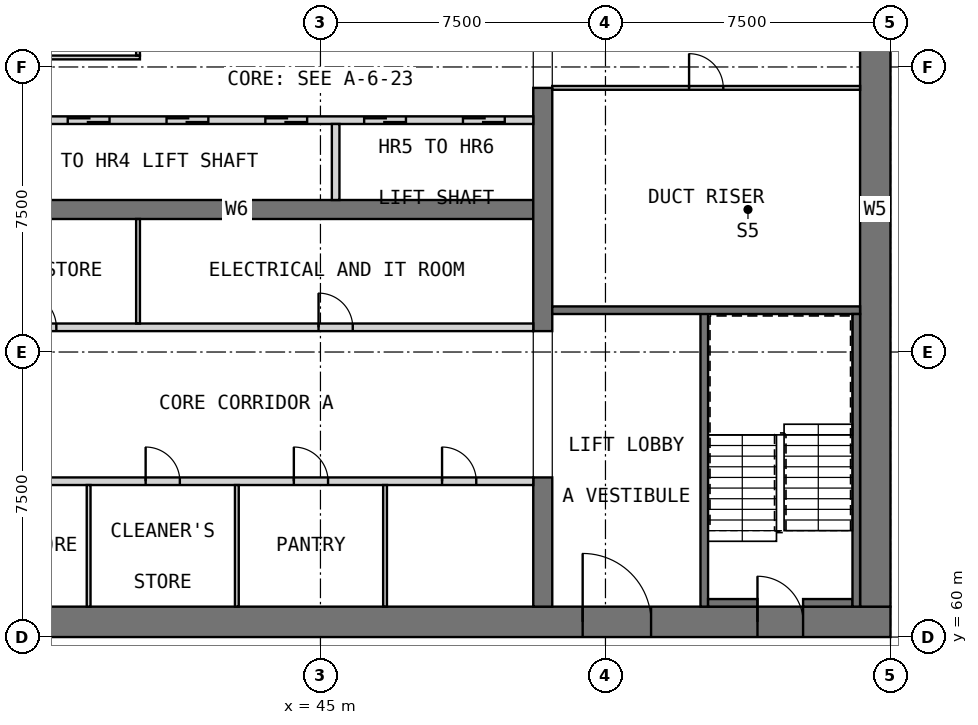
"""IFC4 building model, lengths in metres.
Left out: names, types, materials, properties, quantities, classifications, styles, units other than length and angle.
Written with IfcOpenShell. Run it as: python <this file> out.ifc"""

import sys

from ifc_helpers import new_model, si_unit, direction, frame, frame_2d, origin, place, context, subcontext, project, spatial, rectangle, extrude, element, fill, save


model = new_model("IFC4")
c1 = context("Model", 3, precision=1e-05, world=origin(), true_north=direction((0.0, 1.0)))
c2 = subcontext(c1, "Body", "Model", "MODEL_VIEW")
j1 = project(units=[si_unit("LENGTHUNIT", "METRE"), si_unit("PLANEANGLEUNIT", "RADIAN")], contexts=[c1])
p1 = place(None, origin())
s1 = spatial("IfcSite", under=j1, at=p1, CompositionType="ELEMENT")
p2 = place(p1, origin())
s2 = spatial("IfcBuilding", under=s1, at=p2, CompositionType="ELEMENT")
p3 = place(p2, frame((0.0, 0.0, 186.2)))
s3 = spatial("IfcBuildingStorey", under=s2, at=p3, CompositionType="ELEMENT", Elevation=186.2)
p4 = place(p3, frame((30.0, 60.4, 0.0), z_axis=(0.0, 0.0, 1.0), x_axis=(1.0, 0.0, 0.0)))
e1 = element("IfcWall", 1, at=p4, inside=s3, PredefinedType="SHEAR", context=c2, shape_type="SweptSolid", body=[
    extrude(rectangle(XDim=30.0, YDim=0.8, at=frame_2d((15.0, 0.0))), origin(), (0.0, 0.0, 1.0), 3.5),
])
p5 = place(p4, frame((21.9, 0.0, 0.0)))
e2 = element("IfcOpeningElement", 2, at=p5, cuts=e1, PredefinedType="OPENING", context=c2, shape_type="SweptSolid", body=[
    extrude(rectangle(XDim=1.8, YDim=2.1, at=frame_2d((0.9, 1.05))), frame((0.0, 0.41, 0.0), z_axis=(0.0, -1.0, 0.0), x_axis=(1.0, 0.0, 0.0)), (0.0, 0.0, 1.0), 0.82),
])
p6 = place(p4, frame((26.5, 0.0, 0.0)))
e3 = element("IfcOpeningElement", 3, at=p6, cuts=e1, PredefinedType="OPENING", context=c2, shape_type="SweptSolid", body=[
    extrude(rectangle(XDim=1.2, YDim=2.1, at=frame_2d((0.6, 1.05))), frame((0.0, 0.41, 0.0), z_axis=(0.0, -1.0, 0.0), x_axis=(1.0, 0.0, 0.0)), (0.0, 0.0, 1.0), 0.82),
])
p7 = place(p3, frame((59.6, 60.8, 0.0), z_axis=(0.0, 0.0, 1.0), x_axis=(0.0, 1.0, 0.0)))
e4 = element("IfcWall", 4, at=p7, inside=s3, PredefinedType="SHEAR", context=c2, shape_type="SweptSolid", body=[
    extrude(rectangle(XDim=20.9, YDim=0.8, at=frame_2d((10.45, 0.0))), origin(), (0.0, 0.0, 1.0), 3.5),
])
p8 = place(p7, frame((14.7, 0.0, 0.0)))
e5 = element("IfcOpeningElement", 5, at=p8, cuts=e4, PredefinedType="OPENING", context=c2, shape_type="SweptSolid", body=[
    extrude(rectangle(XDim=1.8, YDim=2.1, at=frame_2d((0.9, 1.05))), frame((0.0, 0.41, 0.0), z_axis=(0.0, -1.0, 0.0), x_axis=(1.0, 0.0, 0.0)), (0.0, 0.0, 1.0), 0.82),
])
p9 = place(p3, frame((35.0, 71.25, 0.0), z_axis=(0.0, 0.0, 1.0), x_axis=(1.0, 0.0, 0.0)))
e6 = element("IfcWall", 6, at=p9, inside=s3, PredefinedType="SHEAR", context=c2, shape_type="SweptSolid", body=[
    extrude(rectangle(XDim=15.6, YDim=0.5, at=frame_2d((7.8, 0.0))), origin(), (0.0, 0.0, 1.0), 3.5),
])
p10 = place(p3, frame((50.85, 60.8, 0.0), z_axis=(0.0, 0.0, 1.0), x_axis=(0.0, 1.0, 0.0)))
e7 = element("IfcWall", 7, at=p10, inside=s3, PredefinedType="SHEAR", context=c2, shape_type="SweptSolid", body=[
    extrude(rectangle(XDim=3.4, YDim=0.5, at=frame_2d((1.7, 0.0))), origin(), (0.0, 0.0, 1.0), 3.5),
])
p11 = place(p3, frame((50.85, 68.05, 0.0), z_axis=(0.0, 0.0, 1.0), x_axis=(0.0, 1.0, 0.0)))
e8 = element("IfcWall", 8, at=p11, inside=s3, PredefinedType="SHEAR", context=c2, shape_type="SweptSolid", body=[
    extrude(rectangle(XDim=6.4, YDim=0.5, at=frame_2d((3.2, 0.0))), origin(), (0.0, 0.0, 1.0), 3.5),
])
p12 = place(p3, frame((35.0, 64.1, 0.0), z_axis=(0.0, 0.0, 1.0), x_axis=(1.0, 0.0, 0.0)))
e9 = element("IfcWall", 9, at=p12, inside=s3, PredefinedType="PARTITIONING", context=c2, shape_type="SweptSolid", body=[
    extrude(rectangle(XDim=15.6, YDim=0.2, at=frame_2d((7.8, 0.0))), origin(), (0.0, 0.0, 1.0), 3.25),
])
p13 = place(p12, frame((1.5, 0.0, 0.0)))
e10 = element("IfcOpeningElement", 10, at=p13, cuts=e9, PredefinedType="OPENING", context=c2, shape_type="SweptSolid", body=[
    extrude(rectangle(XDim=0.9, YDim=2.1, at=frame_2d((0.45, 1.05))), frame((0.0, 0.11, 0.0), z_axis=(0.0, -1.0, 0.0), x_axis=(1.0, 0.0, 0.0)), (0.0, 0.0, 1.0), 0.22),
])
p14 = place(p12, frame((5.4, 0.0, 0.0)))
e11 = element("IfcOpeningElement", 11, at=p14, cuts=e9, PredefinedType="OPENING", context=c2, shape_type="SweptSolid", body=[
    extrude(rectangle(XDim=0.9, YDim=2.1, at=frame_2d((0.45, 1.05))), frame((0.0, 0.11, 0.0), z_axis=(0.0, -1.0, 0.0), x_axis=(1.0, 0.0, 0.0)), (0.0, 0.0, 1.0), 0.22),
])
p15 = place(p12, frame((9.3, 0.0, 0.0)))
e12 = element("IfcOpeningElement", 12, at=p15, cuts=e9, PredefinedType="OPENING", context=c2, shape_type="SweptSolid", body=[
    extrude(rectangle(XDim=0.9, YDim=2.1, at=frame_2d((0.45, 1.05))), frame((0.0, 0.11, 0.0), z_axis=(0.0, -1.0, 0.0), x_axis=(1.0, 0.0, 0.0)), (0.0, 0.0, 1.0), 0.22),
])
p16 = place(p12, frame((13.2, 0.0, 0.0)))
e13 = element("IfcOpeningElement", 13, at=p16, cuts=e9, PredefinedType="OPENING", context=c2, shape_type="SweptSolid", body=[
    extrude(rectangle(XDim=0.9, YDim=2.1, at=frame_2d((0.45, 1.05))), frame((0.0, 0.11, 0.0), z_axis=(0.0, -1.0, 0.0), x_axis=(1.0, 0.0, 0.0)), (0.0, 0.0, 1.0), 0.22),
])
for number, where, z_axis, x_axis in (
    (14, (38.9, 60.8, 0.0), (0.0, 0.0, 1.0), (0.0, 1.0, 0.0)),
    (15, (42.8, 60.8, 0.0), (0.0, 0.0, 1.0), (0.0, 1.0, 0.0)),
    (16, (46.7, 60.8, 0.0), (0.0, 0.0, 1.0), (0.0, 1.0, 0.0)),
):
    element("IfcWall", number, at=place(p3, frame(where, z_axis=z_axis, x_axis=x_axis)), inside=s3, PredefinedType="PARTITIONING", context=c2, shape_type="SweptSolid", body=[
        extrude(rectangle(XDim=3.2, YDim=0.1, at=frame_2d((1.6, 0.0))), origin(), (0.0, 0.0, 1.0), 3.25),
    ])
p17 = place(p3, frame((35.0, 68.15, 0.0), z_axis=(0.0, 0.0, 1.0), x_axis=(1.0, 0.0, 0.0)))
e17 = element("IfcWall", 17, at=p17, inside=s3, PredefinedType="PARTITIONING", context=c2, shape_type="SweptSolid", body=[
    extrude(rectangle(XDim=15.6, YDim=0.2, at=frame_2d((7.8, 0.0))), origin(), (0.0, 0.0, 1.0), 3.25),
])
p18 = place(p17, frame((2.15, 0.0, 0.0)))
e18 = element("IfcOpeningElement", 18, at=p18, cuts=e17, PredefinedType="OPENING", context=c2, shape_type="SweptSolid", body=[
    extrude(rectangle(XDim=0.9, YDim=2.1, at=frame_2d((0.45, 1.05))), frame((0.0, 0.11, 0.0), z_axis=(0.0, -1.0, 0.0), x_axis=(1.0, 0.0, 0.0)), (0.0, 0.0, 1.0), 0.22),
])
p19 = place(p17, frame((9.95, 0.0, 0.0)))
e19 = element("IfcOpeningElement", 19, at=p19, cuts=e17, PredefinedType="OPENING", context=c2, shape_type="SweptSolid", body=[
    extrude(rectangle(XDim=0.9, YDim=2.1, at=frame_2d((0.45, 1.05))), frame((0.0, 0.11, 0.0), z_axis=(0.0, -1.0, 0.0), x_axis=(1.0, 0.0, 0.0)), (0.0, 0.0, 1.0), 0.22),
])
p20 = place(p3, frame((40.2, 68.25, 0.0), z_axis=(0.0, 0.0, 1.0), x_axis=(0.0, 1.0, 0.0)))
e20 = element("IfcWall", 20, at=p20, inside=s3, PredefinedType="PARTITIONING", context=c2, shape_type="SweptSolid", body=[
    extrude(rectangle(XDim=2.75, YDim=0.1, at=frame_2d((1.375, 0.0))), origin(), (0.0, 0.0, 1.0), 3.25),
])
p21 = place(p3, frame((35.0, 73.6, 0.0), z_axis=(0.0, 0.0, 1.0), x_axis=(1.0, 0.0, 0.0)))
e21 = element("IfcWall", 21, at=p21, inside=s3, PredefinedType="SOLIDWALL", context=c2, shape_type="SweptSolid", body=[
    extrude(rectangle(XDim=15.6, YDim=0.2, at=frame_2d((7.8, 0.0))), origin(), (0.0, 0.0, 1.0), 3.5),
])
p22 = place(p21, frame((0.75, 0.0, 0.0)))
e22 = element("IfcOpeningElement", 22, at=p22, cuts=e21, PredefinedType="OPENING", context=c2, shape_type="SweptSolid", body=[
    extrude(rectangle(XDim=1.1, YDim=2.1, at=frame_2d((0.55, 1.05))), frame((0.0, 0.11, 0.0), z_axis=(0.0, -1.0, 0.0), x_axis=(1.0, 0.0, 0.0)), (0.0, 0.0, 1.0), 0.22),
])
p23 = place(p21, frame((3.35, 0.0, 0.0)))
e23 = element("IfcOpeningElement", 23, at=p23, cuts=e21, PredefinedType="OPENING", context=c2, shape_type="SweptSolid", body=[
    extrude(rectangle(XDim=1.1, YDim=2.1, at=frame_2d((0.55, 1.05))), frame((0.0, 0.11, 0.0), z_axis=(0.0, -1.0, 0.0), x_axis=(1.0, 0.0, 0.0)), (0.0, 0.0, 1.0), 0.22),
])
p24 = place(p21, frame((5.95, 0.0, 0.0)))
e24 = element("IfcOpeningElement", 24, at=p24, cuts=e21, PredefinedType="OPENING", context=c2, shape_type="SweptSolid", body=[
    extrude(rectangle(XDim=1.1, YDim=2.1, at=frame_2d((0.55, 1.05))), frame((0.0, 0.11, 0.0), z_axis=(0.0, -1.0, 0.0), x_axis=(1.0, 0.0, 0.0)), (0.0, 0.0, 1.0), 0.22),
])
p25 = place(p21, frame((8.55, 0.0, 0.0)))
e25 = element("IfcOpeningElement", 25, at=p25, cuts=e21, PredefinedType="OPENING", context=c2, shape_type="SweptSolid", body=[
    extrude(rectangle(XDim=1.1, YDim=2.1, at=frame_2d((0.55, 1.05))), frame((0.0, 0.11, 0.0), z_axis=(0.0, -1.0, 0.0), x_axis=(1.0, 0.0, 0.0)), (0.0, 0.0, 1.0), 0.22),
])
p26 = place(p21, frame((11.15, 0.0, 0.0)))
e26 = element("IfcOpeningElement", 26, at=p26, cuts=e21, PredefinedType="OPENING", context=c2, shape_type="SweptSolid", body=[
    extrude(rectangle(XDim=1.1, YDim=2.1, at=frame_2d((0.55, 1.05))), frame((0.0, 0.11, 0.0), z_axis=(0.0, -1.0, 0.0), x_axis=(1.0, 0.0, 0.0)), (0.0, 0.0, 1.0), 0.22),
])
p27 = place(p21, frame((13.75, 0.0, 0.0)))
e27 = element("IfcOpeningElement", 27, at=p27, cuts=e21, PredefinedType="OPENING", context=c2, shape_type="SweptSolid", body=[
    extrude(rectangle(XDim=1.1, YDim=2.1, at=frame_2d((0.55, 1.05))), frame((0.0, 0.11, 0.0), z_axis=(0.0, -1.0, 0.0), x_axis=(1.0, 0.0, 0.0)), (0.0, 0.0, 1.0), 0.22),
])
p28 = place(p3, frame((45.4, 71.5, 0.0), z_axis=(0.0, 0.0, 1.0), x_axis=(0.0, 1.0, 0.0)))
e28 = element("IfcWall", 28, at=p28, inside=s3, PredefinedType="SOLIDWALL", context=c2, shape_type="SweptSolid", body=[
    extrude(rectangle(XDim=2.0, YDim=0.2, at=frame_2d((1.0, 0.0))), origin(), (0.0, 0.0, 1.0), 3.5),
])
p29 = place(p3, frame((35.0, 75.25, 0.0), z_axis=(0.0, 0.0, 1.0), x_axis=(1.0, 0.0, 0.0)))
e29 = element("IfcWall", 29, at=p29, inside=s3, PredefinedType="PARTITIONING", context=c2, shape_type="SweptSolid", body=[
    extrude(rectangle(XDim=5.25, YDim=0.1, at=frame_2d((2.625, 0.0))), origin(), (0.0, 0.0, 1.0), 3.25),
])
p30 = place(p3, frame((40.2, 75.3, 0.0), z_axis=(0.0, 0.0, 1.0), x_axis=(0.0, 1.0, 0.0)))
e30 = element("IfcWall", 30, at=p30, inside=s3, PredefinedType="PARTITIONING", context=c2, shape_type="SweptSolid", body=[
    extrude(rectangle(XDim=3.0, YDim=0.1, at=frame_2d((1.5, 0.0))), origin(), (0.0, 0.0, 1.0), 3.25),
])
p31 = place(p30, frame((1.2, 0.0, 0.0)))
e31 = element("IfcOpeningElement", 31, at=p31, cuts=e30, PredefinedType="OPENING", context=c2, shape_type="SweptSolid", body=[
    extrude(rectangle(XDim=1.1, YDim=2.1, at=frame_2d((0.55, 1.05))), frame((0.0, 0.06, 0.0), z_axis=(0.0, -1.0, 0.0), x_axis=(1.0, 0.0, 0.0)), (0.0, 0.0, 1.0), 0.12),
])
p32 = place(p3, frame((55.1, 60.8, 0.0), z_axis=(0.0, 0.0, 1.0), x_axis=(0.0, 1.0, 0.0)))
e32 = element("IfcWall", 32, at=p32, inside=s3, PredefinedType="SOLIDWALL", context=c2, shape_type="SweptSolid", body=[
    extrude(rectangle(XDim=7.8, YDim=0.2, at=frame_2d((3.9, 0.0))), origin(), (0.0, 0.0, 1.0), 3.25),
])
p33 = place(p3, frame((51.1, 68.6, 0.0), z_axis=(0.0, 0.0, 1.0), x_axis=(1.0, 0.0, 0.0)))
e33 = element("IfcWall", 33, at=p33, inside=s3, PredefinedType="SOLIDWALL", context=c2, shape_type="SweptSolid", body=[
    extrude(rectangle(XDim=8.1, YDim=0.2, at=frame_2d((4.05, 0.0))), origin(), (0.0, 0.0, 1.0), 3.25),
])
for number, where, z_axis, x_axis in (
    (34, (55.2, 60.9, 0.0), (0.0, 0.0, 1.0), (1.0, 0.0, 0.0)),
    (35, (57.7, 60.9, 0.0), (0.0, 0.0, 1.0), (1.0, 0.0, 0.0)),
):
    element("IfcWall", number, at=place(p3, frame(where, z_axis=z_axis, x_axis=x_axis)), inside=s3, PredefinedType="SOLIDWALL", context=c2, shape_type="SweptSolid", body=[
        extrude(rectangle(XDim=1.3, YDim=0.2, at=frame_2d((0.65, 0.0))), origin(), (0.0, 0.0, 1.0), 3.25),
    ])
p34 = place(p3, frame((59.1, 60.8, 0.0), z_axis=(0.0, 0.0, 1.0), x_axis=(0.0, 1.0, 0.0)))
e36 = element("IfcWall", 36, at=p34, inside=s3, PredefinedType="SOLIDWALL", context=c2, shape_type="SweptSolid", body=[
    extrude(rectangle(XDim=7.7, YDim=0.2, at=frame_2d((3.85, 0.0))), origin(), (0.0, 0.0, 1.0), 3.25),
])
p35 = place(p3, frame((51.1, 74.45, 0.0), z_axis=(0.0, 0.0, 1.0), x_axis=(1.0, 0.0, 0.0)))
e37 = element("IfcWall", 37, at=p35, inside=s3, PredefinedType="PARTITIONING", context=c2, shape_type="SweptSolid", body=[
    extrude(rectangle(XDim=8.1, YDim=0.1, at=frame_2d((4.05, 0.0))), origin(), (0.0, 0.0, 1.0), 3.25),
])
p36 = place(p35, frame((3.6, 0.0, 0.0)))
e38 = element("IfcOpeningElement", 38, at=p36, cuts=e37, PredefinedType="OPENING", context=c2, shape_type="SweptSolid", body=[
    extrude(rectangle(XDim=0.9, YDim=2.1, at=frame_2d((0.45, 1.05))), frame((0.0, 0.06, 0.0), z_axis=(0.0, -1.0, 0.0), x_axis=(1.0, 0.0, 0.0)), (0.0, 0.0, 1.0), 0.12),
])
p37 = place(p14, origin())
e39 = element("IfcDoor", 39, at=p37, inside=s3, OperationType="SINGLE_SWING_RIGHT", PredefinedType="DOOR", context=c2, shape_type="SweptSolid", body=[
    extrude(rectangle(XDim=0.9, YDim=2.1, at=frame_2d((0.45, 1.05))), frame((0.0, 0.025, 0.0), z_axis=(0.0, -1.0, 0.0), x_axis=(1.0, 0.0, 0.0)), (0.0, 0.0, 1.0), 0.05),
])
fill(e11, e39)
p38 = place(p15, origin())
e40 = element("IfcDoor", 40, at=p38, inside=s3, OperationType="SINGLE_SWING_LEFT", PredefinedType="DOOR", context=c2, shape_type="SweptSolid", body=[
    extrude(rectangle(XDim=0.9, YDim=2.1, at=frame_2d((0.45, 1.05))), frame((0.0, 0.025, 0.0), z_axis=(0.0, -1.0, 0.0), x_axis=(1.0, 0.0, 0.0)), (0.0, 0.0, 1.0), 0.05),
])
fill(e12, e40)
p39 = place(p16, origin())
e41 = element("IfcDoor", 41, at=p39, inside=s3, OperationType="SINGLE_SWING_RIGHT", PredefinedType="DOOR", context=c2, shape_type="SweptSolid", body=[
    extrude(rectangle(XDim=0.9, YDim=2.1, at=frame_2d((0.45, 1.05))), frame((0.0, 0.025, 0.0), z_axis=(0.0, -1.0, 0.0), x_axis=(1.0, 0.0, 0.0)), (0.0, 0.0, 1.0), 0.05),
])
fill(e13, e41)
p40 = place(p18, origin())
e42 = element("IfcDoor", 42, at=p40, inside=s3, OperationType="SINGLE_SWING_LEFT", PredefinedType="DOOR", context=c2, shape_type="SweptSolid", body=[
    extrude(rectangle(XDim=0.9, YDim=2.1, at=frame_2d((0.45, 1.05))), frame((0.0, 0.025, 0.0), z_axis=(0.0, -1.0, 0.0), x_axis=(1.0, 0.0, 0.0)), (0.0, 0.0, 1.0), 0.05),
])
fill(e18, e42)
p41 = place(p19, origin())
e43 = element("IfcDoor", 43, at=p41, inside=s3, OperationType="SINGLE_SWING_RIGHT", PredefinedType="DOOR", context=c2, shape_type="SweptSolid", body=[
    extrude(rectangle(XDim=0.9, YDim=2.1, at=frame_2d((0.45, 1.05))), frame((0.0, 0.025, 0.0), z_axis=(0.0, -1.0, 0.0), x_axis=(1.0, 0.0, 0.0)), (0.0, 0.0, 1.0), 0.05),
])
fill(e19, e43)
p42 = place(p23, origin())
e44 = element("IfcDoor", 44, at=p42, inside=s3, OperationType="DOUBLE_DOOR_SLIDING", PredefinedType="DOOR", context=c2, shape_type="SweptSolid", body=[
    extrude(rectangle(XDim=1.1, YDim=2.1, at=frame_2d((0.55, 1.05))), frame((0.0, 0.025, 0.0), z_axis=(0.0, -1.0, 0.0), x_axis=(1.0, 0.0, 0.0)), (0.0, 0.0, 1.0), 0.05),
])
fill(e23, e44)
p43 = place(p24, origin())
e45 = element("IfcDoor", 45, at=p43, inside=s3, OperationType="DOUBLE_DOOR_SLIDING", PredefinedType="DOOR", context=c2, shape_type="SweptSolid", body=[
    extrude(rectangle(XDim=1.1, YDim=2.1, at=frame_2d((0.55, 1.05))), frame((0.0, 0.025, 0.0), z_axis=(0.0, -1.0, 0.0), x_axis=(1.0, 0.0, 0.0)), (0.0, 0.0, 1.0), 0.05),
])
fill(e24, e45)
p44 = place(p25, origin())
e46 = element("IfcDoor", 46, at=p44, inside=s3, OperationType="DOUBLE_DOOR_SLIDING", PredefinedType="DOOR", context=c2, shape_type="SweptSolid", body=[
    extrude(rectangle(XDim=1.1, YDim=2.1, at=frame_2d((0.55, 1.05))), frame((0.0, 0.025, 0.0), z_axis=(0.0, -1.0, 0.0), x_axis=(1.0, 0.0, 0.0)), (0.0, 0.0, 1.0), 0.05),
])
fill(e25, e46)
p45 = place(p26, origin())
e47 = element("IfcDoor", 47, at=p45, inside=s3, OperationType="DOUBLE_DOOR_SLIDING", PredefinedType="DOOR", context=c2, shape_type="SweptSolid", body=[
    extrude(rectangle(XDim=1.1, YDim=2.1, at=frame_2d((0.55, 1.05))), frame((0.0, 0.025, 0.0), z_axis=(0.0, -1.0, 0.0), x_axis=(1.0, 0.0, 0.0)), (0.0, 0.0, 1.0), 0.05),
])
fill(e26, e47)
p46 = place(p27, origin())
e48 = element("IfcDoor", 48, at=p46, inside=s3, OperationType="DOUBLE_DOOR_SLIDING", PredefinedType="DOOR", context=c2, shape_type="SweptSolid", body=[
    extrude(rectangle(XDim=1.1, YDim=2.1, at=frame_2d((0.55, 1.05))), frame((0.0, 0.025, 0.0), z_axis=(0.0, -1.0, 0.0), x_axis=(1.0, 0.0, 0.0)), (0.0, 0.0, 1.0), 0.05),
])
fill(e27, e48)
p47 = place(p5, origin())
e49 = element("IfcDoor", 49, at=p47, inside=s3, OperationType="DOUBLE_DOOR_SINGLE_SWING", PredefinedType="DOOR", context=c2, shape_type="SweptSolid", body=[
    extrude(rectangle(XDim=1.8, YDim=2.1, at=frame_2d((0.9, 1.05))), frame((0.0, 0.025, 0.0), z_axis=(0.0, -1.0, 0.0), x_axis=(1.0, 0.0, 0.0)), (0.0, 0.0, 1.0), 0.05),
])
fill(e2, e49)
p48 = place(p6, origin())
e50 = element("IfcDoor", 50, at=p48, inside=s3, OperationType="SINGLE_SWING_LEFT", PredefinedType="DOOR", context=c2, shape_type="SweptSolid", body=[
    extrude(rectangle(XDim=1.2, YDim=2.1, at=frame_2d((0.6, 1.05))), frame((0.0, 0.025, 0.0), z_axis=(0.0, -1.0, 0.0), x_axis=(1.0, 0.0, 0.0)), (0.0, 0.0, 1.0), 0.05),
])
fill(e3, e50)
p49 = place(p36, origin())
e51 = element("IfcDoor", 51, at=p49, inside=s3, OperationType="SINGLE_SWING_LEFT", PredefinedType="DOOR", context=c2, shape_type="SweptSolid", body=[
    extrude(rectangle(XDim=0.9, YDim=2.1, at=frame_2d((0.45, 1.05))), frame((0.0, 0.025, 0.0), z_axis=(0.0, -1.0, 0.0), x_axis=(1.0, 0.0, 0.0)), (0.0, 0.0, 1.0), 0.05),
])
fill(e38, e51)
save(model, sys.argv[1])
